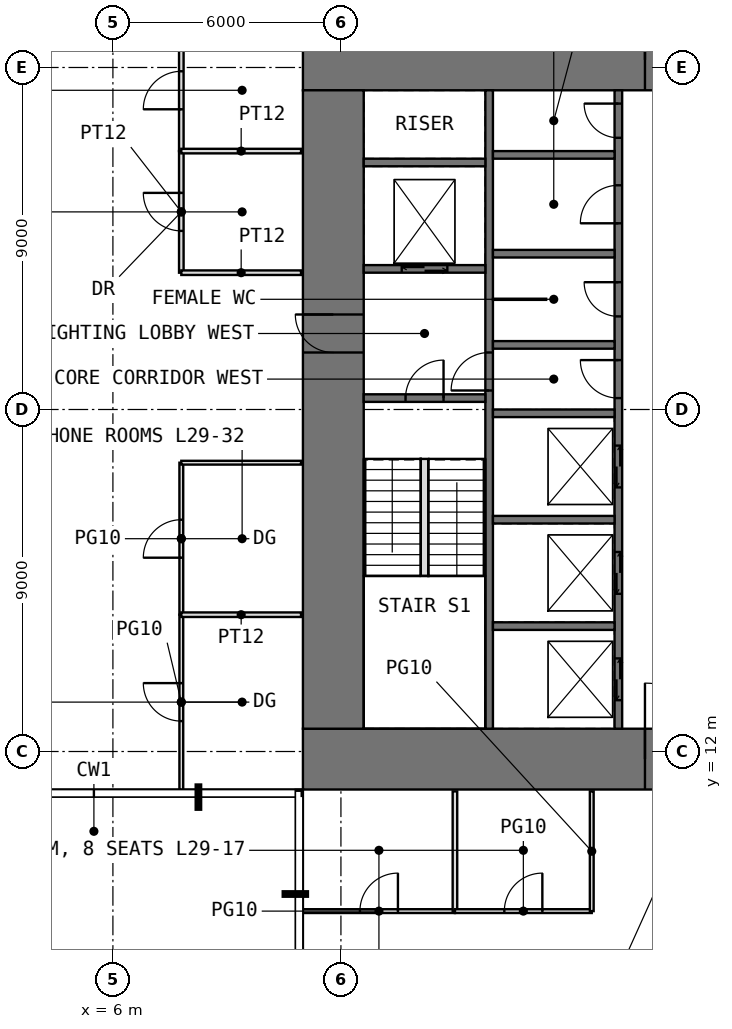
"""IFC4 building model, lengths in metres.
Left out: names, types, materials, properties, quantities, classifications, styles, units other than length and angle.
Written with IfcOpenShell. Run it as: python <this file> out.ifc"""

import sys

from ifc_helpers import new_model, si_unit, direction, frame, frame_2d, origin, place, context, subcontext, project, spatial, rectangle, extrude, element, fill, save


model = new_model("IFC4")
c1 = context("Model", 3, precision=1e-05, world=origin(), true_north=direction((0.0, 1.0)))
c2 = subcontext(c1, "Body", "Model", "MODEL_VIEW")
j1 = project(units=[si_unit("LENGTHUNIT", "METRE"), si_unit("PLANEANGLEUNIT", "RADIAN")], contexts=[c1])
p1 = place(None, origin())
s1 = spatial("IfcSite", under=j1, at=p1, CompositionType="ELEMENT")
p2 = place(p1, origin())
s2 = spatial("IfcBuilding", under=s1, at=p2, CompositionType="ELEMENT")
p3 = place(p2, frame((0.0, 0.0, 124.5)))
s3 = spatial("IfcBuildingStorey", under=s2, at=p3, CompositionType="ELEMENT", Elevation=124.5)
p4 = place(p3, frame((11.0, 11.8, -0.05), z_axis=(0.0, 0.0, 1.0), x_axis=(1.0, 0.0, 0.0)))
e1 = element("IfcWall", 1, at=p4, inside=s3, PredefinedType="SHEAR", context=c2, shape_type="SweptSolid", body=[
    extrude(rectangle(XDim=20.0, YDim=1.6, at=frame_2d((10.0, 0.0))), origin(), (0.0, 0.0, 1.0), 4.0),
])
p5 = place(p4, frame((9.0, 0.0, 0.05)))
e2 = element("IfcOpeningElement", 2, at=p5, cuts=e1, PredefinedType="OPENING", context=c2, shape_type="SweptSolid", body=[
    extrude(rectangle(XDim=2.0, YDim=2.2, at=frame_2d((1.0, 1.1))), frame((0.0, 0.81, 0.0), z_axis=(0.0, -1.0, 0.0), x_axis=(1.0, 0.0, 0.0)), (0.0, 0.0, 1.0), 1.62),
])
p6 = place(p3, frame((11.0, 30.2, -0.05), z_axis=(0.0, 0.0, 1.0), x_axis=(1.0, 0.0, 0.0)))
e3 = element("IfcWall", 3, at=p6, inside=s3, PredefinedType="SHEAR", context=c2, shape_type="SweptSolid", body=[
    extrude(rectangle(XDim=20.0, YDim=1.6, at=frame_2d((10.0, 0.0))), origin(), (0.0, 0.0, 1.0), 4.0),
])
p7 = place(p6, frame((9.0, 0.0, 0.05)))
e4 = element("IfcOpeningElement", 4, at=p7, cuts=e3, PredefinedType="OPENING", context=c2, shape_type="SweptSolid", body=[
    extrude(rectangle(XDim=2.0, YDim=2.2, at=frame_2d((1.0, 1.1))), frame((0.0, 0.81, 0.0), z_axis=(0.0, -1.0, 0.0), x_axis=(1.0, 0.0, 0.0)), (0.0, 0.0, 1.0), 1.62),
])
p8 = place(p3, frame((11.8, 12.6, -0.05), z_axis=(0.0, 0.0, 1.0), x_axis=(0.0, 1.0, 0.0)))
e5 = element("IfcWall", 5, at=p8, inside=s3, PredefinedType="SHEAR", context=c2, shape_type="SweptSolid", body=[
    extrude(rectangle(XDim=16.8, YDim=1.6, at=frame_2d((8.4, 0.0))), origin(), (0.0, 0.0, 1.0), 4.0),
])
p9 = place(p8, frame((9.9, 0.0, 0.05)))
e6 = element("IfcOpeningElement", 6, at=p9, cuts=e5, PredefinedType="OPENING", context=c2, shape_type="SweptSolid", body=[
    extrude(rectangle(XDim=1.0, YDim=2.2, at=frame_2d((0.5, 1.1))), frame((0.0, 0.81, 0.0), z_axis=(0.0, -1.0, 0.0), x_axis=(1.0, 0.0, 0.0)), (0.0, 0.0, 1.0), 1.62),
])
p10 = place(p3, frame((15.9, 12.6, -0.05), z_axis=(0.0, 0.0, 1.0), x_axis=(0.0, 1.0, 0.0)))
e7 = element("IfcWall", 7, at=p10, inside=s3, PredefinedType="SHEAR", context=c2, shape_type="SweptSolid", body=[
    extrude(rectangle(XDim=16.8, YDim=0.2, at=frame_2d((8.4, 0.0))), origin(), (0.0, 0.0, 1.0), 4.0),
])
p11 = place(p10, frame((8.9, 0.0, 0.05)))
e8 = element("IfcOpeningElement", 8, at=p11, cuts=e7, PredefinedType="OPENING", context=c2, shape_type="SweptSolid", body=[
    extrude(rectangle(XDim=1.0, YDim=2.2, at=frame_2d((0.5, 1.1))), frame((0.0, 0.11, 0.0), z_axis=(0.0, -1.0, 0.0), x_axis=(1.0, 0.0, 0.0)), (0.0, 0.0, 1.0), 0.22),
])
p12 = place(p3, frame((19.3, 12.6, -0.05), z_axis=(0.0, 0.0, 1.0), x_axis=(0.0, 1.0, 0.0)))
e9 = element("IfcWall", 9, at=p12, inside=s3, PredefinedType="SHEAR", context=c2, shape_type="SweptSolid", body=[
    extrude(rectangle(XDim=16.8, YDim=0.2, at=frame_2d((8.4, 0.0))), origin(), (0.0, 0.0, 1.0), 4.0),
])
p13 = place(p12, frame((8.7, 0.0, 0.05)))
e10 = element("IfcOpeningElement", 10, at=p13, cuts=e9, PredefinedType="OPENING", context=c2, shape_type="SweptSolid", body=[
    extrude(rectangle(XDim=1.0, YDim=2.2, at=frame_2d((0.5, 1.1))), frame((0.0, 0.11, 0.0), z_axis=(0.0, -1.0, 0.0), x_axis=(1.0, 0.0, 0.0)), (0.0, 0.0, 1.0), 0.22),
])
p14 = place(p12, frame((10.85, 0.0, 0.05)))
e11 = element("IfcOpeningElement", 11, at=p14, cuts=e9, PredefinedType="OPENING", context=c2, shape_type="SweptSolid", body=[
    extrude(rectangle(XDim=0.9, YDim=2.2, at=frame_2d((0.45, 1.1))), frame((0.0, 0.11, 0.0), z_axis=(0.0, -1.0, 0.0), x_axis=(1.0, 0.0, 0.0)), (0.0, 0.0, 1.0), 0.22),
])
p15 = place(p12, frame((13.3, 0.0, 0.05)))
e12 = element("IfcOpeningElement", 12, at=p15, cuts=e9, PredefinedType="OPENING", context=c2, shape_type="SweptSolid", body=[
    extrude(rectangle(XDim=1.0, YDim=2.2, at=frame_2d((0.5, 1.1))), frame((0.0, 0.11, 0.0), z_axis=(0.0, -1.0, 0.0), x_axis=(1.0, 0.0, 0.0)), (0.0, 0.0, 1.0), 0.22),
])
p16 = place(p12, frame((15.55, 0.0, 0.05)))
e13 = element("IfcOpeningElement", 13, at=p16, cuts=e9, PredefinedType="OPENING", context=c2, shape_type="SweptSolid", body=[
    extrude(rectangle(XDim=0.9, YDim=2.2, at=frame_2d((0.45, 1.1))), frame((0.0, 0.11, 0.0), z_axis=(0.0, -1.0, 0.0), x_axis=(1.0, 0.0, 0.0)), (0.0, 0.0, 1.0), 0.22),
])
p17 = place(p12, frame((0.75, 0.0, 0.05)))
e14 = element("IfcOpeningElement", 14, at=p17, cuts=e9, PredefinedType="OPENING", context=c2, shape_type="SweptSolid", body=[
    extrude(rectangle(XDim=1.1, YDim=2.2, at=frame_2d((0.55, 1.1))), frame((0.0, 0.11, 0.0), z_axis=(0.0, -1.0, 0.0), x_axis=(1.0, 0.0, 0.0)), (0.0, 0.0, 1.0), 0.22),
])
p18 = place(p12, frame((3.55, 0.0, 0.05)))
e15 = element("IfcOpeningElement", 15, at=p18, cuts=e9, PredefinedType="OPENING", context=c2, shape_type="SweptSolid", body=[
    extrude(rectangle(XDim=1.1, YDim=2.2, at=frame_2d((0.55, 1.1))), frame((0.0, 0.11, 0.0), z_axis=(0.0, -1.0, 0.0), x_axis=(1.0, 0.0, 0.0)), (0.0, 0.0, 1.0), 0.22),
])
p19 = place(p12, frame((6.35, 0.0, 0.05)))
e16 = element("IfcOpeningElement", 16, at=p19, cuts=e9, PredefinedType="OPENING", context=c2, shape_type="SweptSolid", body=[
    extrude(rectangle(XDim=1.1, YDim=2.2, at=frame_2d((0.55, 1.1))), frame((0.0, 0.11, 0.0), z_axis=(0.0, -1.0, 0.0), x_axis=(1.0, 0.0, 0.0)), (0.0, 0.0, 1.0), 0.22),
])
p20 = place(p3, frame((12.6, 21.3, -0.05), z_axis=(0.0, 0.0, 1.0), x_axis=(1.0, 0.0, 0.0)))
e17 = element("IfcWall", 17, at=p20, inside=s3, PredefinedType="SHEAR", context=c2, shape_type="SweptSolid", body=[
    extrude(rectangle(XDim=3.2, YDim=0.2, at=frame_2d((1.6, 0.0))), origin(), (0.0, 0.0, 1.0), 4.0),
])
p21 = place(p20, frame((1.1, 0.0, 0.05)))
e18 = element("IfcOpeningElement", 18, at=p21, cuts=e17, PredefinedType="OPENING", context=c2, shape_type="SweptSolid", body=[
    extrude(rectangle(XDim=1.0, YDim=2.2, at=frame_2d((0.5, 1.1))), frame((0.0, 0.11, 0.0), z_axis=(0.0, -1.0, 0.0), x_axis=(1.0, 0.0, 0.0)), (0.0, 0.0, 1.0), 0.22),
])
p22 = place(p3, frame((12.6, 24.7, -0.05), z_axis=(0.0, 0.0, 1.0), x_axis=(1.0, 0.0, 0.0)))
e19 = element("IfcWall", 19, at=p22, inside=s3, PredefinedType="SHEAR", context=c2, shape_type="SweptSolid", body=[
    extrude(rectangle(XDim=3.2, YDim=0.2, at=frame_2d((1.6, 0.0))), origin(), (0.0, 0.0, 1.0), 4.0),
])
p23 = place(p22, frame((1.0, 0.0, 0.05)))
e20 = element("IfcOpeningElement", 20, at=p23, cuts=e19, PredefinedType="OPENING", context=c2, shape_type="SweptSolid", body=[
    extrude(rectangle(XDim=1.2, YDim=2.2, at=frame_2d((0.6, 1.1))), frame((0.0, 0.11, 0.0), z_axis=(0.0, -1.0, 0.0), x_axis=(1.0, 0.0, 0.0)), (0.0, 0.0, 1.0), 0.22),
])
for number, where, z_axis, x_axis in (
    (21, (12.6, 27.5, -0.05), (0.0, 0.0, 1.0), (1.0, 0.0, 0.0)),
    (22, (16.0, 15.3, -0.05), (0.0, 0.0, 1.0), (1.0, 0.0, 0.0)),
    (23, (16.0, 18.1, -0.05), (0.0, 0.0, 1.0), (1.0, 0.0, 0.0)),
    (24, (16.0, 20.9, -0.05), (0.0, 0.0, 1.0), (1.0, 0.0, 0.0)),
    (25, (16.0, 22.7, -0.05), (0.0, 0.0, 1.0), (1.0, 0.0, 0.0)),
    (26, (16.0, 25.1, -0.05), (0.0, 0.0, 1.0), (1.0, 0.0, 0.0)),
    (27, (16.0, 27.7, -0.05), (0.0, 0.0, 1.0), (1.0, 0.0, 0.0)),
):
    element("IfcWall", number, at=place(p3, frame(where, z_axis=z_axis, x_axis=x_axis)), inside=s3, PredefinedType="SHEAR", context=c2, shape_type="SweptSolid", body=[
        extrude(rectangle(XDim=3.2, YDim=0.2, at=frame_2d((1.6, 0.0))), origin(), (0.0, 0.0, 1.0), 4.0),
    ])
p24 = place(p3, frame((16.0, 23.9, 0.0), z_axis=(0.0, 0.0, 1.0), x_axis=(1.0, 0.0, 0.0)))
e28 = element("IfcWall", 28, at=p24, inside=s3, PredefinedType="PARTITIONING", context=c2, shape_type="SweptSolid", body=[
    extrude(rectangle(XDim=1.4, YDim=0.03, at=frame_2d((0.7, 0.0))), origin(), (0.0, 0.0, 1.0), 3.75),
])
p25 = place(p3, frame((7.8, 11.0, 0.0), z_axis=(0.0, 0.0, 1.0), x_axis=(0.0, 1.0, 0.0)))
e29 = element("IfcWall", 29, at=p25, inside=s3, PredefinedType="PARTITIONING", context=c2, shape_type="SweptSolid", body=[
    extrude(rectangle(XDim=4.6, YDim=0.1, at=frame_2d((2.3, 0.0))), origin(), (0.0, 0.0, 1.0), 3.75),
])
p26 = place(p25, frame((1.8, 0.0, 0.0)))
e30 = element("IfcOpeningElement", 30, at=p26, cuts=e29, PredefinedType="OPENING", context=c2, shape_type="SweptSolid", body=[
    extrude(rectangle(XDim=1.0, YDim=2.4, at=frame_2d((0.5, 1.2))), frame((0.0, 0.06, 0.0), z_axis=(0.0, -1.0, 0.0), x_axis=(1.0, 0.0, 0.0)), (0.0, 0.0, 1.0), 0.12),
])
p27 = place(p3, frame((7.8, 15.6, 0.0), z_axis=(0.0, 0.0, 1.0), x_axis=(0.0, 1.0, 0.0)))
e31 = element("IfcWall", 31, at=p27, inside=s3, PredefinedType="PARTITIONING", context=c2, shape_type="SweptSolid", body=[
    extrude(rectangle(XDim=4.0, YDim=0.1, at=frame_2d((2.0, 0.0))), origin(), (0.0, 0.0, 1.0), 3.75),
])
p28 = place(p27, frame((1.5, 0.0, 0.0)))
e32 = element("IfcOpeningElement", 32, at=p28, cuts=e31, PredefinedType="OPENING", context=c2, shape_type="SweptSolid", body=[
    extrude(rectangle(XDim=1.0, YDim=2.4, at=frame_2d((0.5, 1.2))), frame((0.0, 0.06, 0.0), z_axis=(0.0, -1.0, 0.0), x_axis=(1.0, 0.0, 0.0)), (0.0, 0.0, 1.0), 0.12),
])
p29 = place(p3, frame((7.8, 15.6, 0.0), z_axis=(0.0, 0.0, 1.0), x_axis=(1.0, 0.0, 0.0)))
e33 = element("IfcWall", 33, at=p29, inside=s3, PredefinedType="PARTITIONING", context=c2, shape_type="SweptSolid", body=[
    extrude(rectangle(XDim=3.15, YDim=0.12, at=frame_2d((1.575, 0.0))), origin(), (0.0, 0.0, 1.0), 3.75),
])
p30 = place(p3, frame((7.8, 19.6, 0.0), z_axis=(0.0, 0.0, 1.0), x_axis=(1.0, 0.0, 0.0)))
e34 = element("IfcWall", 34, at=p30, inside=s3, PredefinedType="PARTITIONING", context=c2, shape_type="SweptSolid", body=[
    extrude(rectangle(XDim=3.15, YDim=0.1, at=frame_2d((1.575, 0.0))), origin(), (0.0, 0.0, 1.0), 3.75),
])
p31 = place(p3, frame((7.8, 24.6, 0.0), z_axis=(0.0, 0.0, 1.0), x_axis=(0.0, 1.0, 0.0)))
e35 = element("IfcWall", 35, at=p31, inside=s3, PredefinedType="PARTITIONING", context=c2, shape_type="SweptSolid", body=[
    extrude(rectangle(XDim=3.2, YDim=0.12, at=frame_2d((1.6, 0.0))), origin(), (0.0, 0.0, 1.0), 3.75),
])
p32 = place(p31, frame((1.1, 0.0, 0.0)))
e36 = element("IfcOpeningElement", 36, at=p32, cuts=e35, PredefinedType="OPENING", context=c2, shape_type="SweptSolid", body=[
    extrude(rectangle(XDim=1.0, YDim=2.2, at=frame_2d((0.5, 1.1))), frame((0.0, 0.07, 0.0), z_axis=(0.0, -1.0, 0.0), x_axis=(1.0, 0.0, 0.0)), (0.0, 0.0, 1.0), 0.14),
])
p33 = place(p3, frame((7.8, 24.6, 0.0), z_axis=(0.0, 0.0, 1.0), x_axis=(1.0, 0.0, 0.0)))
e37 = element("IfcWall", 37, at=p33, inside=s3, PredefinedType="PARTITIONING", context=c2, shape_type="SweptSolid", body=[
    extrude(rectangle(XDim=3.15, YDim=0.12, at=frame_2d((1.575, 0.0))), origin(), (0.0, 0.0, 1.0), 3.75),
])
p34 = place(p3, frame((7.8, 27.8, 0.0), z_axis=(0.0, 0.0, 1.0), x_axis=(0.0, 1.0, 0.0)))
e38 = element("IfcWall", 38, at=p34, inside=s3, PredefinedType="PARTITIONING", context=c2, shape_type="SweptSolid", body=[
    extrude(rectangle(XDim=3.2, YDim=0.12, at=frame_2d((1.6, 0.0))), origin(), (0.0, 0.0, 1.0), 3.75),
])
p35 = place(p34, frame((1.1, 0.0, 0.0)))
e39 = element("IfcOpeningElement", 39, at=p35, cuts=e38, PredefinedType="OPENING", context=c2, shape_type="SweptSolid", body=[
    extrude(rectangle(XDim=1.0, YDim=2.2, at=frame_2d((0.5, 1.1))), frame((0.0, 0.07, 0.0), z_axis=(0.0, -1.0, 0.0), x_axis=(1.0, 0.0, 0.0)), (0.0, 0.0, 1.0), 0.14),
])
p36 = place(p3, frame((7.8, 27.8, 0.0), z_axis=(0.0, 0.0, 1.0), x_axis=(1.0, 0.0, 0.0)))
e40 = element("IfcWall", 40, at=p36, inside=s3, PredefinedType="PARTITIONING", context=c2, shape_type="SweptSolid", body=[
    extrude(rectangle(XDim=3.15, YDim=0.12, at=frame_2d((1.575, 0.0))), origin(), (0.0, 0.0, 1.0), 3.75),
])
p37 = place(p3, frame((11.0, 7.8, 0.0), z_axis=(0.0, 0.0, 1.0), x_axis=(1.0, 0.0, 0.0)))
e41 = element("IfcWall", 41, at=p37, inside=s3, PredefinedType="PARTITIONING", context=c2, shape_type="SweptSolid", body=[
    extrude(rectangle(XDim=4.0, YDim=0.1, at=frame_2d((2.0, 0.0))), origin(), (0.0, 0.0, 1.0), 3.75),
])
p38 = place(p37, frame((1.5, 0.0, 0.0)))
e42 = element("IfcOpeningElement", 42, at=p38, cuts=e41, PredefinedType="OPENING", context=c2, shape_type="SweptSolid", body=[
    extrude(rectangle(XDim=1.0, YDim=2.4, at=frame_2d((0.5, 1.2))), frame((0.0, 0.06, 0.0), z_axis=(0.0, -1.0, 0.0), x_axis=(1.0, 0.0, 0.0)), (0.0, 0.0, 1.0), 0.12),
])
p39 = place(p3, frame((15.0, 7.8, 0.0), z_axis=(0.0, 0.0, 1.0), x_axis=(0.0, 1.0, 0.0)))
e43 = element("IfcWall", 43, at=p39, inside=s3, PredefinedType="PARTITIONING", context=c2, shape_type="SweptSolid", body=[
    extrude(rectangle(XDim=3.15, YDim=0.12, at=frame_2d((1.575, 0.0))), origin(), (0.0, 0.0, 1.0), 3.75),
])
p40 = place(p3, frame((15.0, 7.8, 0.0), z_axis=(0.0, 0.0, 1.0), x_axis=(1.0, 0.0, 0.0)))
e44 = element("IfcWall", 44, at=p40, inside=s3, PredefinedType="PARTITIONING", context=c2, shape_type="SweptSolid", body=[
    extrude(rectangle(XDim=3.6, YDim=0.1, at=frame_2d((1.8, 0.0))), origin(), (0.0, 0.0, 1.0), 3.75),
])
p41 = place(p40, frame((1.3, 0.0, 0.0)))
e45 = element("IfcOpeningElement", 45, at=p41, cuts=e44, PredefinedType="OPENING", context=c2, shape_type="SweptSolid", body=[
    extrude(rectangle(XDim=1.0, YDim=2.4, at=frame_2d((0.5, 1.2))), frame((0.0, 0.06, 0.0), z_axis=(0.0, -1.0, 0.0), x_axis=(1.0, 0.0, 0.0)), (0.0, 0.0, 1.0), 0.12),
])
p42 = place(p3, frame((18.6, 7.8, 0.0), z_axis=(0.0, 0.0, 1.0), x_axis=(0.0, 1.0, 0.0)))
e46 = element("IfcWall", 46, at=p42, inside=s3, PredefinedType="PARTITIONING", context=c2, shape_type="SweptSolid", body=[
    extrude(rectangle(XDim=3.15, YDim=0.1, at=frame_2d((1.575, 0.0))), origin(), (0.0, 0.0, 1.0), 3.75),
])
p43 = place(p3, frame((14.2, 16.62, 0.0), z_axis=(0.0, 0.0, 1.0), x_axis=(0.0, 1.0, 0.0)))
e47 = element("IfcWall", 47, at=p43, inside=s3, PredefinedType="PARTITIONING", context=c2, shape_type="SweptSolid", body=[
    extrude(rectangle(XDim=3.08, YDim=0.2, at=frame_2d((1.54, 0.0))), origin(), (0.0, 0.0, 1.0), 4.0),
])
p44 = place(p5, origin())
e48 = element("IfcDoor", 48, at=p44, inside=s3, OperationType="DOUBLE_DOOR_SINGLE_SWING", PredefinedType="DOOR", context=c2, shape_type="SweptSolid", body=[
    extrude(rectangle(XDim=2.0, YDim=2.2, at=frame_2d((1.0, 1.1))), frame((0.0, 0.025, 0.0), z_axis=(0.0, -1.0, 0.0), x_axis=(1.0, 0.0, 0.0)), (0.0, 0.0, 1.0), 0.05),
])
fill(e2, e48)
p45 = place(p7, origin())
e49 = element("IfcDoor", 49, at=p45, inside=s3, OperationType="DOUBLE_DOOR_SINGLE_SWING", PredefinedType="DOOR", context=c2, shape_type="SweptSolid", body=[
    extrude(rectangle(XDim=2.0, YDim=2.2, at=frame_2d((1.0, 1.1))), frame((0.0, 0.025, 0.0), z_axis=(0.0, -1.0, 0.0), x_axis=(1.0, 0.0, 0.0)), (0.0, 0.0, 1.0), 0.05),
])
fill(e4, e49)
p46 = place(p9, origin())
e50 = element("IfcDoor", 50, at=p46, inside=s3, OperationType="SINGLE_SWING_RIGHT", PredefinedType="DOOR", context=c2, shape_type="SweptSolid", body=[
    extrude(rectangle(XDim=1.0, YDim=2.2, at=frame_2d((0.5, 1.1))), frame((0.0, 0.025, 0.0), z_axis=(0.0, -1.0, 0.0), x_axis=(1.0, 0.0, 0.0)), (0.0, 0.0, 1.0), 0.05),
])
fill(e6, e50)
p47 = place(p21, origin())
e51 = element("IfcDoor", 51, at=p47, inside=s3, OperationType="SINGLE_SWING_RIGHT", PredefinedType="DOOR", context=c2, shape_type="SweptSolid", body=[
    extrude(rectangle(XDim=1.0, YDim=2.2, at=frame_2d((0.5, 1.1))), frame((0.0, 0.025, 0.0), z_axis=(0.0, -1.0, 0.0), x_axis=(1.0, 0.0, 0.0)), (0.0, 0.0, 1.0), 0.05),
])
fill(e18, e51)
p48 = place(p11, origin())
e52 = element("IfcDoor", 52, at=p48, inside=s3, OperationType="SINGLE_SWING_LEFT", PredefinedType="DOOR", context=c2, shape_type="SweptSolid", body=[
    extrude(rectangle(XDim=1.0, YDim=2.2, at=frame_2d((0.5, 1.1))), frame((0.0, 0.025, 0.0), z_axis=(0.0, -1.0, 0.0), x_axis=(1.0, 0.0, 0.0)), (0.0, 0.0, 1.0), 0.05),
])
fill(e8, e52)
p49 = place(p13, origin())
e53 = element("IfcDoor", 53, at=p49, inside=s3, OperationType="SINGLE_SWING_RIGHT", PredefinedType="DOOR", context=c2, shape_type="SweptSolid", body=[
    extrude(rectangle(XDim=1.0, YDim=2.2, at=frame_2d((0.5, 1.1))), frame((0.0, 0.025, 0.0), z_axis=(0.0, -1.0, 0.0), x_axis=(1.0, 0.0, 0.0)), (0.0, 0.0, 1.0), 0.05),
])
fill(e10, e53)
p50 = place(p14, origin())
e54 = element("IfcDoor", 54, at=p50, inside=s3, OperationType="SINGLE_SWING_RIGHT", PredefinedType="DOOR", context=c2, shape_type="SweptSolid", body=[
    extrude(rectangle(XDim=0.9, YDim=2.2, at=frame_2d((0.45, 1.1))), frame((0.0, 0.025, 0.0), z_axis=(0.0, -1.0, 0.0), x_axis=(1.0, 0.0, 0.0)), (0.0, 0.0, 1.0), 0.05),
])
fill(e11, e54)
p51 = place(p15, origin())
e55 = element("IfcDoor", 55, at=p51, inside=s3, OperationType="SINGLE_SWING_LEFT", PredefinedType="DOOR", context=c2, shape_type="SweptSolid", body=[
    extrude(rectangle(XDim=1.0, YDim=2.2, at=frame_2d((0.5, 1.1))), frame((0.0, 0.025, 0.0), z_axis=(0.0, -1.0, 0.0), x_axis=(1.0, 0.0, 0.0)), (0.0, 0.0, 1.0), 0.05),
])
fill(e12, e55)
p52 = place(p16, origin())
e56 = element("IfcDoor", 56, at=p52, inside=s3, OperationType="SINGLE_SWING_RIGHT", PredefinedType="DOOR", context=c2, shape_type="SweptSolid", body=[
    extrude(rectangle(XDim=0.9, YDim=2.2, at=frame_2d((0.45, 1.1))), frame((0.0, 0.025, 0.0), z_axis=(0.0, -1.0, 0.0), x_axis=(1.0, 0.0, 0.0)), (0.0, 0.0, 1.0), 0.05),
])
fill(e13, e56)
p53 = place(p38, origin())
e57 = element("IfcDoor", 57, at=p53, inside=s3, OperationType="SINGLE_SWING_RIGHT", PredefinedType="DOOR", context=c2, shape_type="SweptSolid", body=[
    extrude(rectangle(XDim=1.0, YDim=2.4, at=frame_2d((0.5, 1.2))), frame((0.0, 0.025, 0.0), z_axis=(0.0, -1.0, 0.0), x_axis=(1.0, 0.0, 0.0)), (0.0, 0.0, 1.0), 0.05),
])
fill(e42, e57)
p54 = place(p41, origin())
e58 = element("IfcDoor", 58, at=p54, inside=s3, OperationType="SINGLE_SWING_RIGHT", PredefinedType="DOOR", context=c2, shape_type="SweptSolid", body=[
    extrude(rectangle(XDim=1.0, YDim=2.4, at=frame_2d((0.5, 1.2))), frame((0.0, 0.025, 0.0), z_axis=(0.0, -1.0, 0.0), x_axis=(1.0, 0.0, 0.0)), (0.0, 0.0, 1.0), 0.05),
])
fill(e45, e58)
p55 = place(p26, origin())
e59 = element("IfcDoor", 59, at=p55, inside=s3, OperationType="SINGLE_SWING_RIGHT", PredefinedType="DOOR", context=c2, shape_type="SweptSolid", body=[
    extrude(rectangle(XDim=1.0, YDim=2.4, at=frame_2d((0.5, 1.2))), frame((0.0, 0.025, 0.0), z_axis=(0.0, -1.0, 0.0), x_axis=(1.0, 0.0, 0.0)), (0.0, 0.0, 1.0), 0.05),
])
fill(e30, e59)
p56 = place(p28, origin())
e60 = element("IfcDoor", 60, at=p56, inside=s3, OperationType="SINGLE_SWING_LEFT", PredefinedType="DOOR", context=c2, shape_type="SweptSolid", body=[
    extrude(rectangle(XDim=1.0, YDim=2.4, at=frame_2d((0.5, 1.2))), frame((0.0, 0.025, 0.0), z_axis=(0.0, -1.0, 0.0), x_axis=(1.0, 0.0, 0.0)), (0.0, 0.0, 1.0), 0.05),
])
fill(e32, e60)
p57 = place(p32, origin())
e61 = element("IfcDoor", 61, at=p57, inside=s3, OperationType="SINGLE_SWING_RIGHT", PredefinedType="DOOR", context=c2, shape_type="SweptSolid", body=[
    extrude(rectangle(XDim=1.0, YDim=2.2, at=frame_2d((0.5, 1.1))), frame((0.0, 0.025, 0.0), z_axis=(0.0, -1.0, 0.0), x_axis=(1.0, 0.0, 0.0)), (0.0, 0.0, 1.0), 0.05),
])
fill(e36, e61)
p58 = place(p35, origin())
e62 = element("IfcDoor", 62, at=p58, inside=s3, OperationType="SINGLE_SWING_LEFT", PredefinedType="DOOR", context=c2, shape_type="SweptSolid", body=[
    extrude(rectangle(XDim=1.0, YDim=2.2, at=frame_2d((0.5, 1.1))), frame((0.0, 0.025, 0.0), z_axis=(0.0, -1.0, 0.0), x_axis=(1.0, 0.0, 0.0)), (0.0, 0.0, 1.0), 0.05),
])
fill(e39, e62)
p59 = place(p17, origin())
e63 = element("IfcDoor", 63, at=p59, inside=s3, OperationType="DOUBLE_DOOR_SLIDING", PredefinedType="DOOR", context=c2, shape_type="SweptSolid", body=[
    extrude(rectangle(XDim=1.1, YDim=2.2, at=frame_2d((0.55, 1.1))), frame((0.0, 0.025, 0.0), z_axis=(0.0, -1.0, 0.0), x_axis=(1.0, 0.0, 0.0)), (0.0, 0.0, 1.0), 0.05),
])
fill(e14, e63)
p60 = place(p18, origin())
e64 = element("IfcDoor", 64, at=p60, inside=s3, OperationType="DOUBLE_DOOR_SLIDING", PredefinedType="DOOR", context=c2, shape_type="SweptSolid", body=[
    extrude(rectangle(XDim=1.1, YDim=2.2, at=frame_2d((0.55, 1.1))), frame((0.0, 0.025, 0.0), z_axis=(0.0, -1.0, 0.0), x_axis=(1.0, 0.0, 0.0)), (0.0, 0.0, 1.0), 0.05),
])
fill(e15, e64)
p61 = place(p19, origin())
e65 = element("IfcDoor", 65, at=p61, inside=s3, OperationType="DOUBLE_DOOR_SLIDING", PredefinedType="DOOR", context=c2, shape_type="SweptSolid", body=[
    extrude(rectangle(XDim=1.1, YDim=2.2, at=frame_2d((0.55, 1.1))), frame((0.0, 0.025, 0.0), z_axis=(0.0, -1.0, 0.0), x_axis=(1.0, 0.0, 0.0)), (0.0, 0.0, 1.0), 0.05),
])
fill(e16, e65)
p62 = place(p23, origin())
e66 = element("IfcDoor", 66, at=p62, inside=s3, OperationType="DOUBLE_DOOR_SLIDING", PredefinedType="DOOR", context=c2, shape_type="SweptSolid", body=[
    extrude(rectangle(XDim=1.2, YDim=2.2, at=frame_2d((0.6, 1.1))), frame((0.0, 0.025, 0.0), z_axis=(0.0, -1.0, 0.0), x_axis=(1.0, 0.0, 0.0)), (0.0, 0.0, 1.0), 0.05),
])
fill(e20, e66)
save(model, sys.argv[1])
